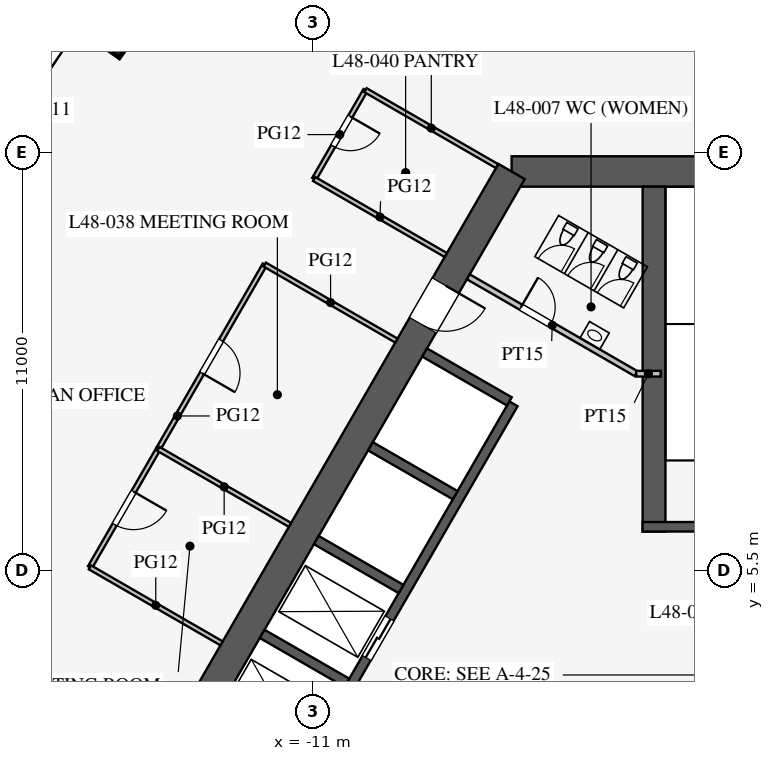
"""IFC4 building model, lengths in metres.
Left out: names, types, materials, properties, quantities, classifications, styles, units other than length and angle.
Written with IfcOpenShell. Run it as: python <this file> out.ifc"""

import sys

from ifc_helpers import new_model, si_unit, direction, frame, frame_2d, origin, origin_2d, place, context, subcontext, project, spatial, rectangle, extrude, element, fill, save


model = new_model("IFC4")
c1 = context("Model", 3, precision=1e-05, world=origin(), true_north=direction((0.0, 1.0)))
c2 = subcontext(c1, "Body", "Model", "MODEL_VIEW")
j1 = project(units=[si_unit("LENGTHUNIT", "METRE"), si_unit("PLANEANGLEUNIT", "RADIAN")], contexts=[c1])
p1 = place(None, origin())
s1 = spatial("IfcSite", under=j1, at=p1, CompositionType="ELEMENT")
p2 = place(p1, origin())
s2 = spatial("IfcBuilding", under=s1, at=p2, CompositionType="ELEMENT")
p3 = place(p2, frame((0.0, 0.0, 210.7)))
s3 = spatial("IfcBuildingStorey", under=s2, at=p3, CompositionType="ELEMENT", Elevation=210.7)
p4 = place(p3, frame((-16.227, 19.761, 0.0), z_axis=(0.0, 0.0, 1.0), x_axis=(-0.577481198806, -0.81640398396, 0.0)))
e1 = element("IfcColumn", 1, at=p4, inside=s3, PredefinedType="COLUMN", context=c2, shape_type="SweptSolid", body=[
    extrude(rectangle(XDim=1.1, YDim=1.1, at=origin_2d()), origin(), (0.0, 0.0, 1.0), 4.2),
])
p5 = place(p3, frame((5.773, 16.0, 0.0), z_axis=(0.0, 0.0, 1.0), x_axis=(-1.0, 0.0, 0.0)))
e2 = element("IfcWall", 2, at=p5, inside=s3, PredefinedType="SHEAR", context=c2, shape_type="SweptSolid", body=[
    extrude(rectangle(XDim=11.547, YDim=0.8, at=frame_2d((5.773, 0.0))), origin(), (0.0, 0.0, 1.0), 4.2),
])
p6 = place(p3, frame((-5.773, 16.0, 0.0), z_axis=(0.0, 0.0, 1.0), x_axis=(-0.500002442456, -0.866023993627, 0.0)))
e3 = element("IfcWall", 3, at=p6, inside=s3, PredefinedType="SHEAR", context=c2, shape_type="SweptSolid", body=[
    extrude(rectangle(XDim=21.939, YDim=0.8, at=frame_2d((10.97, 0.0))), origin(), (0.0, 0.0, 1.0), 4.2),
])
p7 = place(p6, frame((17.27, 0.0, 0.0)))
e4 = element("IfcOpeningElement", 4, at=p7, cuts=e3, PredefinedType="OPENING", context=c2, shape_type="SweptSolid", body=[
    extrude(rectangle(XDim=1.2, YDim=2.1, at=frame_2d((0.6, 1.05))), frame((0.0, 0.41, 0.0), z_axis=(0.0, -1.0, 0.0), x_axis=(1.0, 0.0, 0.0)), (0.0, 0.0, 1.0), 0.82),
])
p8 = place(p6, frame((3.47, 0.0, 0.0)))
e5 = element("IfcOpeningElement", 5, at=p8, cuts=e3, PredefinedType="OPENING", context=c2, shape_type="SweptSolid", body=[
    extrude(rectangle(XDim=1.2, YDim=2.1, at=frame_2d((0.6, 1.05))), frame((0.0, 0.41, 0.0), z_axis=(0.0, -1.0, 0.0), x_axis=(1.0, 0.0, 0.0)), (0.0, 0.0, 1.0), 0.82),
])
p9 = place(p3, frame((-5.724, 9.886, 0.0), z_axis=(0.0, 0.0, 1.0), x_axis=(-0.500001763848, -0.866024385424, 0.0)))
e6 = element("IfcWall", 6, at=p9, inside=s3, PredefinedType="SHEAR", context=c2, shape_type="SweptSolid", body=[
    extrude(rectangle(XDim=11.4, YDim=0.25, at=frame_2d((5.7, 0.0))), origin(), (0.0, 0.0, 1.0), 4.2),
])
p10 = place(p9, frame((6.525, 0.0, 0.0)))
e7 = element("IfcOpeningElement", 7, at=p10, cuts=e6, PredefinedType="OPENING", context=c2, shape_type="SweptSolid", body=[
    extrude(rectangle(XDim=1.2, YDim=2.2, at=frame_2d((0.6, 1.1))), frame((0.0, 0.135, 0.0), z_axis=(0.0, -1.0, 0.0), x_axis=(1.0, 0.0, 0.0)), (0.0, 0.0, 1.0), 0.27),
])
p11 = place(p9, frame((9.375, 0.0, 0.0)))
e8 = element("IfcOpeningElement", 8, at=p11, cuts=e6, PredefinedType="OPENING", context=c2, shape_type="SweptSolid", body=[
    extrude(rectangle(XDim=1.2, YDim=2.2, at=frame_2d((0.6, 1.1))), frame((0.0, 0.135, 0.0), z_axis=(0.0, -1.0, 0.0), x_axis=(1.0, 0.0, 0.0)), (0.0, 0.0, 1.0), 0.27),
])
p12 = place(p3, frame((-5.832, 9.949, 0.0), z_axis=(0.0, 0.0, 1.0), x_axis=(-0.866029291668, 0.499993265928, 0.0)))
e9 = element("IfcWall", 9, at=p12, inside=s3, PredefinedType="SHEAR", context=c2, shape_type="SweptSolid", body=[
    extrude(rectangle(XDim=2.575, YDim=0.25, at=frame_2d((1.288, 0.0))), origin(), (0.0, 0.0, 1.0), 4.2),
])
for number, where, z_axis, x_axis in (
    (10, (-7.257, 7.481, 0.0), (0.0, 0.0, 1.0), (-0.866, 0.5, 0.0)),
    (11, (-8.682, 5.012, 0.0), (0.0, 0.0, 1.0), (-0.866, 0.5, 0.0)),
    (12, (-10.107, 2.544, 0.0), (0.0, 0.0, 1.0), (-0.866, 0.5, 0.0)),
):
    element("IfcWall", number, at=place(p3, frame(where, z_axis=z_axis, x_axis=x_axis)), inside=s3, PredefinedType="SHEAR", context=c2, shape_type="SweptSolid", body=[
        extrude(rectangle(XDim=2.575, YDim=0.25, at=frame_2d((1.288, 0.0))), origin(), (0.0, 0.0, 1.0), 4.2),
    ])
p13 = place(p3, frame((-2.025, 6.525, 0.0), z_axis=(0.0, 0.0, 1.0), x_axis=(0.0, 1.0, 0.0)))
e13 = element("IfcWall", 13, at=p13, inside=s3, PredefinedType="SHEAR", context=c2, shape_type="SweptSolid", body=[
    extrude(rectangle(XDim=9.075, YDim=0.6, at=frame_2d((4.538, 0.0))), origin(), (0.0, 0.0, 1.0), 4.2),
])
p14 = place(p3, frame((2.325, 6.65, 0.0), z_axis=(0.0, 0.0, 1.0), x_axis=(-1.0, 0.0, 0.0)))
e14 = element("IfcWall", 14, at=p14, inside=s3, PredefinedType="SHEAR", context=c2, shape_type="SweptSolid", body=[
    extrude(rectangle(XDim=4.65, YDim=0.25, at=frame_2d((2.325, 0.0))), origin(), (0.0, 0.0, 1.0), 4.2),
])
p15 = place(p14, frame((1.525, 0.0, 0.0)))
e15 = element("IfcOpeningElement", 15, at=p15, cuts=e14, PredefinedType="OPENING", context=c2, shape_type="SweptSolid", body=[
    extrude(rectangle(XDim=1.6, YDim=2.1, at=frame_2d((0.8, 1.05))), frame((0.0, 0.135, 0.0), z_axis=(0.0, -1.0, 0.0), x_axis=(1.0, 0.0, 0.0)), (0.0, 0.0, 1.0), 0.27),
])
p16 = place(p3, frame((-2.495, 10.678, 0.0), z_axis=(0.0, 0.0, 1.0), x_axis=(-0.86602216432, 0.500005610874, 0.0)))
e16 = element("IfcWall", 16, at=p16, inside=s3, PredefinedType="PARTITIONING", context=c2, shape_type="SweptSolid", body=[
    extrude(rectangle(XDim=5.1, YDim=0.15, at=frame_2d((2.55, 0.0))), origin(), (0.0, 0.0, 1.0), 4.0),
])
p17 = place(p16, frame((2.6, 0.0, 0.0)))
e17 = element("IfcOpeningElement", 17, at=p17, cuts=e16, PredefinedType="OPENING", context=c2, shape_type="SweptSolid", body=[
    extrude(rectangle(XDim=0.9, YDim=2.1, at=frame_2d((0.45, 1.05))), frame((0.0, 0.085, 0.0), z_axis=(0.0, -1.0, 0.0), x_axis=(1.0, 0.0, 0.0)), (0.0, 0.0, 1.0), 0.17),
])
p18 = place(p3, frame((-2.495, 10.678, 0.0), z_axis=(0.0, 0.0, 1.0), x_axis=(1.0, 0.0, 0.0)))
e18 = element("IfcWall", 18, at=p18, inside=s3, PredefinedType="PARTITIONING", context=c2, shape_type="SweptSolid", body=[
    extrude(rectangle(XDim=0.645, YDim=0.15, at=frame_2d((0.323, 0.0))), origin(), (0.0, 0.0, 1.0), 4.0),
])
p19 = place(p3, frame((-15.069, 8.7, 0.0), z_axis=(0.0, 0.0, 1.0), x_axis=(-0.500012057535, -0.866018442252, 0.0)))
e19 = element("IfcWall", 19, at=p19, inside=s3, PredefinedType="PARTITIONING", context=c2, shape_type="SweptSolid", body=[
    extrude(rectangle(XDim=3.6, YDim=0.12, at=frame_2d((1.8, 0.0))), origin(), (0.0, 0.0, 1.0), 2.9),
])
p20 = place(p19, frame((1.3, 0.0, 0.15)))
e20 = element("IfcOpeningElement", 20, at=p20, cuts=e19, PredefinedType="OPENING", context=c2, shape_type="SweptSolid", body=[
    extrude(rectangle(XDim=1.0, YDim=2.1, at=frame_2d((0.5, 1.05))), frame((0.0, 0.07, 0.0), z_axis=(0.0, -1.0, 0.0), x_axis=(1.0, 0.0, 0.0)), (0.0, 0.0, 1.0), 0.14),
])
p21 = place(p3, frame((-9.619, 18.14, 0.0), z_axis=(0.0, 0.0, 1.0), x_axis=(-0.499980770555, -0.866036505625, 0.0)))
e21 = element("IfcWall", 21, at=p21, inside=s3, PredefinedType="PARTITIONING", context=c2, shape_type="SweptSolid", body=[
    extrude(rectangle(XDim=2.7, YDim=0.12, at=frame_2d((1.35, 0.0))), origin(), (0.0, 0.0, 1.0), 2.9),
])
p22 = place(p21, frame((0.8, 0.0, 0.15)))
e22 = element("IfcOpeningElement", 22, at=p22, cuts=e21, PredefinedType="OPENING", context=c2, shape_type="SweptSolid", body=[
    extrude(rectangle(XDim=0.9, YDim=2.1, at=frame_2d((0.45, 1.05))), frame((0.0, 0.07, 0.0), z_axis=(0.0, -1.0, 0.0), x_axis=(1.0, 0.0, 0.0)), (0.0, 0.0, 1.0), 0.14),
])
p23 = place(p3, frame((-12.269, 13.55, 0.0), z_axis=(0.0, 0.0, 1.0), x_axis=(-0.49999793692, -0.866026594901, 0.0)))
e23 = element("IfcWall", 23, at=p23, inside=s3, PredefinedType="PARTITIONING", context=c2, shape_type="SweptSolid", body=[
    extrude(rectangle(XDim=5.6, YDim=0.12, at=frame_2d((2.8, 0.0))), origin(), (0.0, 0.0, 1.0), 2.9),
])
p24 = place(p23, frame((2.3, 0.0, 0.15)))
e24 = element("IfcOpeningElement", 24, at=p24, cuts=e23, PredefinedType="OPENING", context=c2, shape_type="SweptSolid", body=[
    extrude(rectangle(XDim=1.0, YDim=2.1, at=frame_2d((0.5, 1.05))), frame((0.0, 0.07, 0.0), z_axis=(0.0, -1.0, 0.0), x_axis=(1.0, 0.0, 0.0)), (0.0, 0.0, 1.0), 0.14),
])
for number, where, z_axis, x_axis in (
    (25, (-13.405, 3.582, 0.0), (0.0, 0.0, 1.0), (-0.866, 0.5, 0.0)),
    (26, (-11.605, 6.7, 0.0), (0.0, 0.0, 1.0), (-0.866, 0.5, 0.0)),
    (27, (-6.155, 16.14, 0.0), (0.0, 0.0, 1.0), (-0.866, 0.5, 0.0)),
    (28, (-8.805, 11.55, 0.0), (0.0, 0.0, 1.0), (-0.866, 0.5, 0.0)),
    (29, (-7.505, 13.802, 0.0), (0.0, 0.0, 1.0), (-0.866, 0.5, 0.0)),
):
    element("IfcWall", number, at=place(p3, frame(where, z_axis=z_axis, x_axis=x_axis)), inside=s3, PredefinedType="PARTITIONING", context=c2, shape_type="SweptSolid", body=[
        extrude(rectangle(XDim=4.0, YDim=0.12, at=frame_2d((2.0, 0.0))), origin(), (0.0, 0.0, 1.0), 2.9),
    ])
p25 = place(p17, frame((0.9, 0.0, 0.0), z_axis=(0.0, 0.0, 1.0), x_axis=(-1.0, 0.0, 0.0)))
e30 = element("IfcDoor", 30, at=p25, inside=s3, OperationType="SINGLE_SWING_LEFT", PredefinedType="DOOR", context=c2, shape_type="SweptSolid", body=[
    extrude(rectangle(XDim=0.9, YDim=2.1, at=frame_2d((0.45, 1.05))), frame((0.0, 0.025, 0.0), z_axis=(0.0, -1.0, 0.0), x_axis=(1.0, 0.0, 0.0)), (0.0, 0.0, 1.0), 0.05),
])
fill(e17, e30)
p26 = place(p8, origin())
e31 = element("IfcDoor", 31, at=p26, inside=s3, OperationType="SINGLE_SWING_LEFT", PredefinedType="DOOR", context=c2, shape_type="SweptSolid", body=[
    extrude(rectangle(XDim=1.2, YDim=2.1, at=frame_2d((0.6, 1.05))), frame((0.0, 0.025, 0.0), z_axis=(0.0, -1.0, 0.0), x_axis=(1.0, 0.0, 0.0)), (0.0, 0.0, 1.0), 0.05),
])
fill(e5, e31)
p27 = place(p24, origin())
e32 = element("IfcDoor", 32, at=p27, inside=s3, OperationType="SINGLE_SWING_RIGHT", PredefinedType="DOOR", context=c2, shape_type="SweptSolid", body=[
    extrude(rectangle(XDim=1.0, YDim=2.1, at=frame_2d((0.5, 1.05))), frame((0.0, 0.025, 0.0), z_axis=(0.0, -1.0, 0.0), x_axis=(1.0, 0.0, 0.0)), (0.0, 0.0, 1.0), 0.05),
])
fill(e24, e32)
p28 = place(p20, origin())
e33 = element("IfcDoor", 33, at=p28, inside=s3, OperationType="SINGLE_SWING_LEFT", PredefinedType="DOOR", context=c2, shape_type="SweptSolid", body=[
    extrude(rectangle(XDim=1.0, YDim=2.1, at=frame_2d((0.5, 1.05))), frame((0.0, 0.025, 0.0), z_axis=(0.0, -1.0, 0.0), x_axis=(1.0, 0.0, 0.0)), (0.0, 0.0, 1.0), 0.05),
])
fill(e20, e33)
p29 = place(p22, origin())
e34 = element("IfcDoor", 34, at=p29, inside=s3, OperationType="SINGLE_SWING_LEFT", PredefinedType="DOOR", context=c2, shape_type="SweptSolid", body=[
    extrude(rectangle(XDim=0.9, YDim=2.1, at=frame_2d((0.45, 1.05))), frame((0.0, 0.025, 0.0), z_axis=(0.0, -1.0, 0.0), x_axis=(1.0, 0.0, 0.0)), (0.0, 0.0, 1.0), 0.05),
])
fill(e22, e34)
p30 = place(p10, origin())
e35 = element("IfcDoor", 35, at=p30, inside=s3, OperationType="DOUBLE_DOOR_SLIDING", PredefinedType="DOOR", context=c2, shape_type="SweptSolid", body=[
    extrude(rectangle(XDim=1.2, YDim=2.2, at=frame_2d((0.6, 1.1))), frame((0.0, 0.025, 0.0), z_axis=(0.0, -1.0, 0.0), x_axis=(1.0, 0.0, 0.0)), (0.0, 0.0, 1.0), 0.05),
])
fill(e7, e35)
save(model, sys.argv[1])
